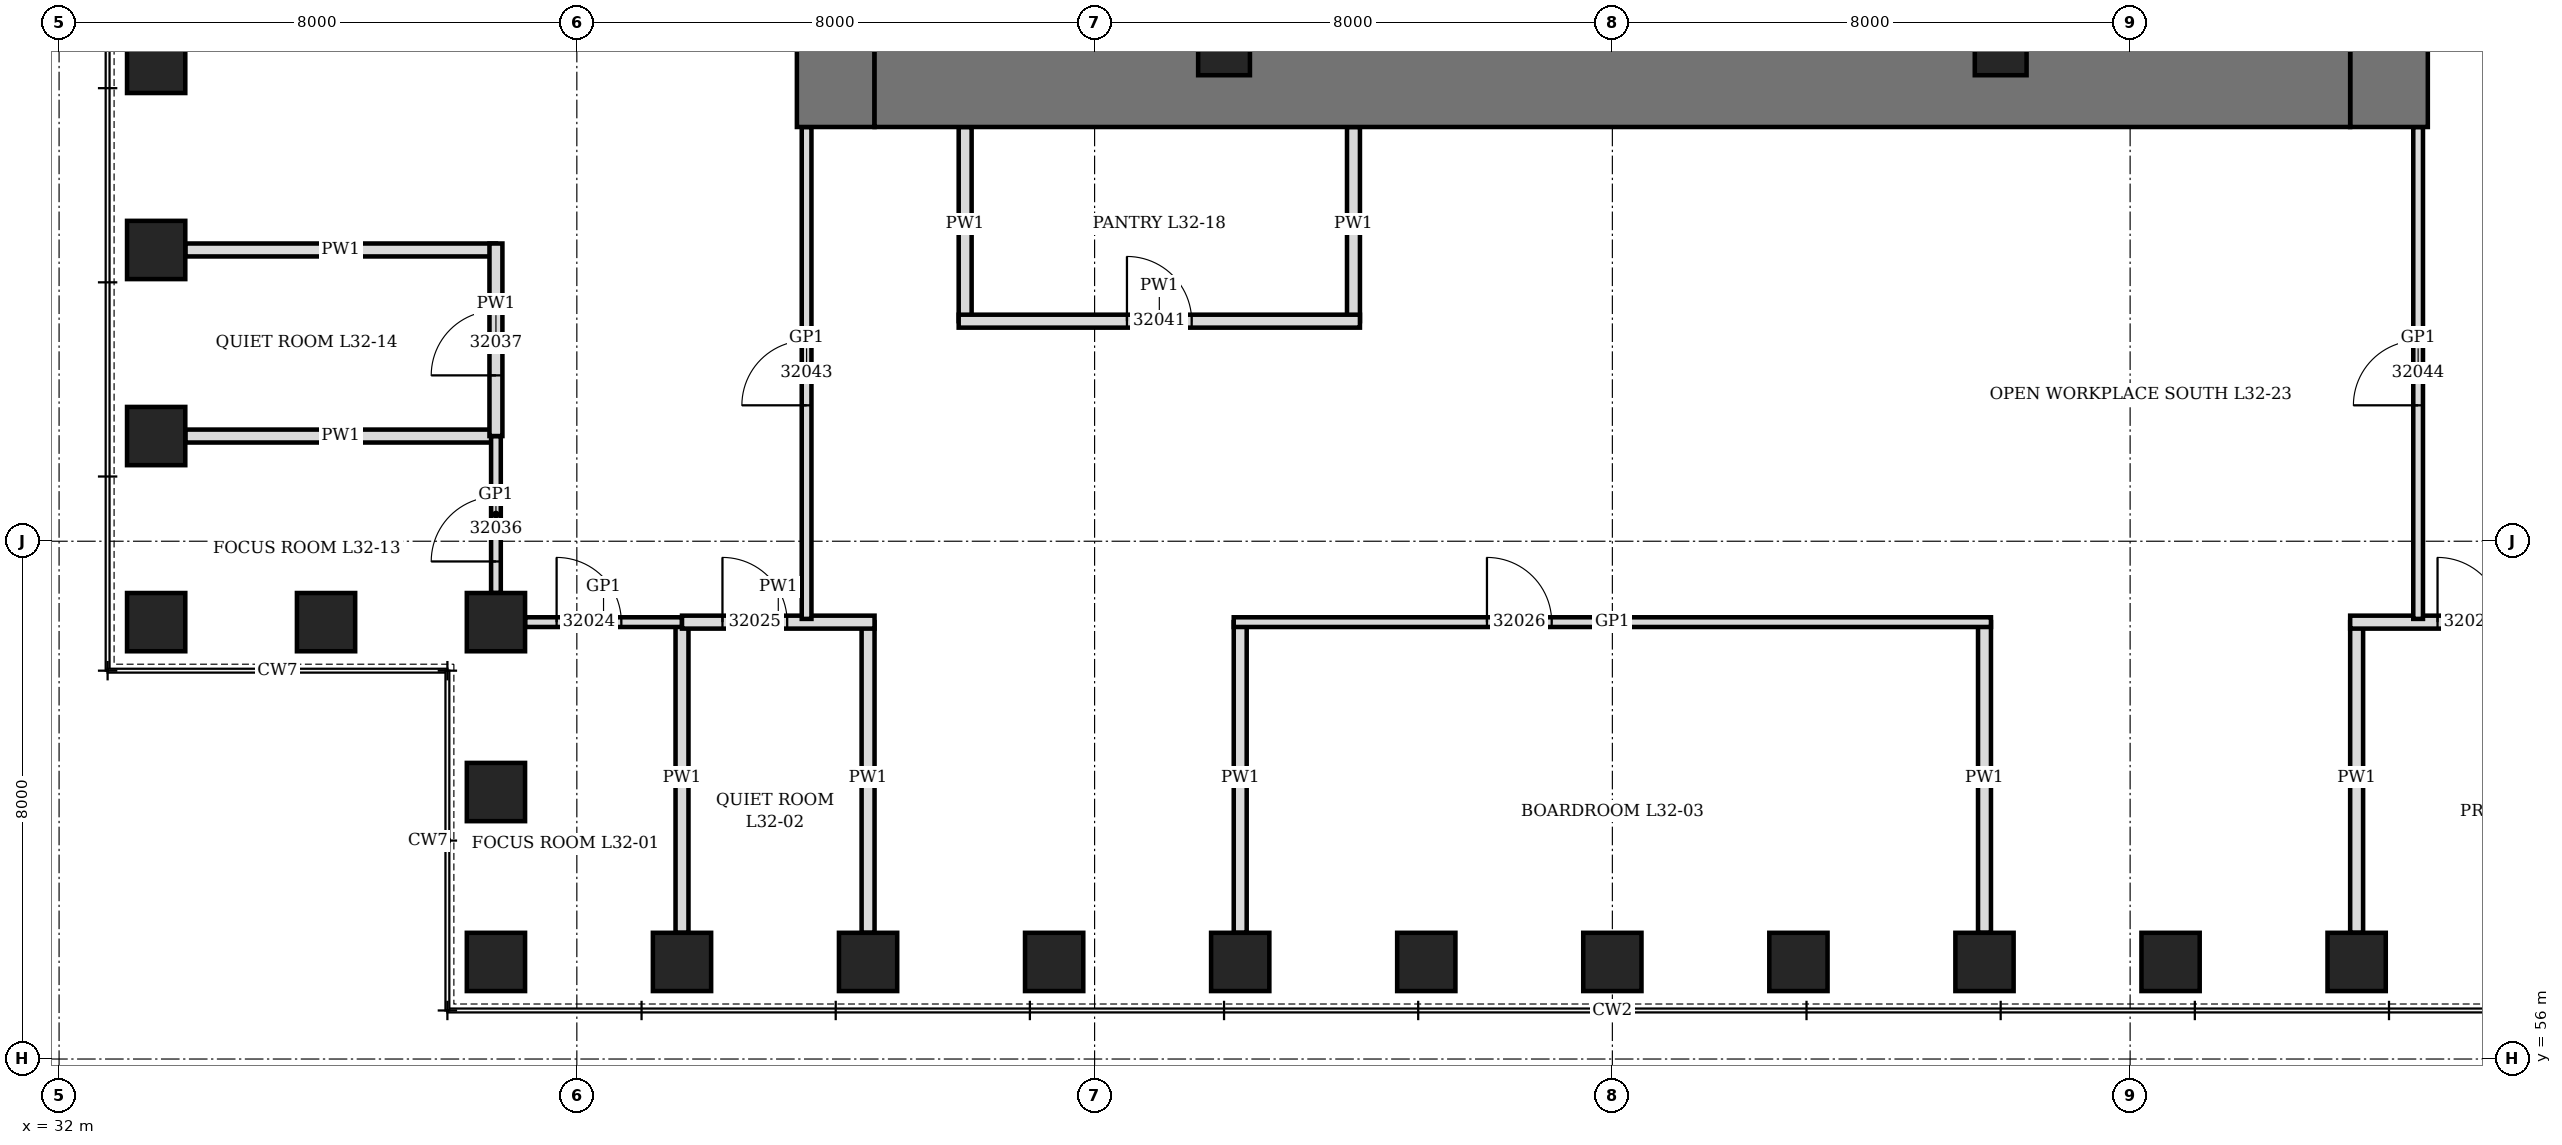
"""IFC4 building model, lengths in metres.
Left out: names, types, materials, properties, quantities, classifications, styles, units other than length and angle.
Written with IfcOpenShell. Run it as: python <this file> out.ifc"""

import sys

from ifc_helpers import new_model, si_unit, direction, frame, frame_2d, origin, origin_2d, place, context, subcontext, project, spatial, rectangle, hollow_rectangle, extrude, element, fill, save


model = new_model("IFC4")
c1 = context("Model", 3, precision=1e-05, world=origin(), true_north=direction((0.0, 1.0)))
c2 = subcontext(c1, "Body", "Model", "MODEL_VIEW")
j1 = project(units=[si_unit("LENGTHUNIT", "METRE"), si_unit("PLANEANGLEUNIT", "RADIAN")], contexts=[c1])
p1 = place(None, origin())
s1 = spatial("IfcSite", under=j1, at=p1, CompositionType="ELEMENT")
p2 = place(p1, origin())
s2 = spatial("IfcBuilding", under=s1, at=p2, CompositionType="ELEMENT")
p3 = place(p2, frame((0.0, 0.0, 145.9)))
s3 = spatial("IfcBuildingStorey", under=s2, at=p3, CompositionType="ELEMENT", Elevation=145.9)
for number, where, z_axis, x_axis in (
    (1, (38.75, 57.5, 0.0), (0.0, 0.0, 1.0), (1.0, 0.0, 0.0)),
    (2, (41.625, 57.5, 0.0), (0.0, 0.0, 1.0), (1.0, 0.0, 0.0)),
    (3, (44.5, 57.5, 0.0), (0.0, 0.0, 1.0), (1.0, 0.0, 0.0)),
    (4, (47.375, 57.5, 0.0), (0.0, 0.0, 1.0), (1.0, 0.0, 0.0)),
    (5, (50.25, 57.5, 0.0), (0.0, 0.0, 1.0), (1.0, 0.0, 0.0)),
    (6, (53.125, 57.5, 0.0), (0.0, 0.0, 1.0), (1.0, 0.0, 0.0)),
    (7, (56.0, 57.5, 0.0), (0.0, 0.0, 1.0), (1.0, 0.0, 0.0)),
    (8, (58.875, 57.5, 0.0), (0.0, 0.0, 1.0), (1.0, 0.0, 0.0)),
    (9, (61.75, 57.5, 0.0), (0.0, 0.0, 1.0), (1.0, 0.0, 0.0)),
    (10, (64.625, 57.5, 0.0), (0.0, 0.0, 1.0), (1.0, 0.0, 0.0)),
    (11, (67.5, 57.5, 0.0), (0.0, 0.0, 1.0), (1.0, 0.0, 0.0)),
    (12, (33.5, 71.375, 0.0), (0.0, 0.0, 1.0), (0.0, 1.0, 0.0)),
    (13, (33.5, 68.5, 0.0), (0.0, 0.0, 1.0), (0.0, 1.0, 0.0)),
    (14, (33.5, 65.625, 0.0), (0.0, 0.0, 1.0), (0.0, 1.0, 0.0)),
    (15, (33.5, 62.75, 0.0), (0.0, 0.0, 1.0), (1.0, 0.0, 0.0)),
    (16, (36.125, 62.75, 0.0), (0.0, 0.0, 1.0), (1.0, 0.0, 0.0)),
    (17, (38.75, 62.75, 0.0), (0.0, 0.0, 1.0), (0.0, 1.0, 0.0)),
    (18, (38.75, 60.125, 0.0), (0.0, 0.0, 1.0), (0.0, 1.0, 0.0)),
):
    element("IfcColumn", number, at=place(p3, frame(where, z_axis=z_axis, x_axis=x_axis)), inside=s3, PredefinedType="COLUMN", context=c2, shape_type="SweptSolid", body=[
        extrude(hollow_rectangle(XDim=0.9, YDim=0.9, WallThickness=0.12, at=origin_2d()), origin(), (0.0, 0.0, 1.0), 4.2),
    ])
p4 = place(p3, frame((44.0, 70.4, 0.0), z_axis=(0.0, 0.0, 1.0), x_axis=(0.0, 1.0, 0.0)))
e19 = element("IfcWall", 19, at=p4, inside=s3, PredefinedType="SHEAR", context=c2, shape_type="SweptSolid", body=[
    extrude(rectangle(XDim=19.2, YDim=1.2, at=frame_2d((9.6, 0.0))), origin(), (0.0, 0.0, 1.0), 4.2),
])
p5 = place(p4, frame((8.6, 0.0, 0.0)))
e20 = element("IfcOpeningElement", 20, at=p5, cuts=e19, PredefinedType="OPENING", context=c2, shape_type="SweptSolid", body=[
    extrude(rectangle(XDim=2.0, YDim=2.4, at=frame_2d((1.0, 1.2))), frame((0.0, 0.61, 0.0), z_axis=(0.0, -1.0, 0.0), x_axis=(1.0, 0.0, 0.0)), (0.0, 0.0, 1.0), 1.22),
])
p6 = place(p3, frame((68.0, 70.4, 0.0), z_axis=(0.0, 0.0, 1.0), x_axis=(0.0, 1.0, 0.0)))
e21 = element("IfcWall", 21, at=p6, inside=s3, PredefinedType="SHEAR", context=c2, shape_type="SweptSolid", body=[
    extrude(rectangle(XDim=19.2, YDim=1.2, at=frame_2d((9.6, 0.0))), origin(), (0.0, 0.0, 1.0), 4.2),
])
p7 = place(p6, frame((8.6, 0.0, 0.0)))
e22 = element("IfcOpeningElement", 22, at=p7, cuts=e21, PredefinedType="OPENING", context=c2, shape_type="SweptSolid", body=[
    extrude(rectangle(XDim=2.0, YDim=2.4, at=frame_2d((1.0, 1.2))), frame((0.0, 0.61, 0.0), z_axis=(0.0, -1.0, 0.0), x_axis=(1.0, 0.0, 0.0)), (0.0, 0.0, 1.0), 1.22),
])
p8 = place(p3, frame((44.6, 71.0, 0.0), z_axis=(0.0, 0.0, 1.0), x_axis=(1.0, 0.0, 0.0)))
e23 = element("IfcWall", 23, at=p8, inside=s3, PredefinedType="SHEAR", context=c2, shape_type="SweptSolid", body=[
    extrude(rectangle(XDim=22.8, YDim=1.2, at=frame_2d((11.4, 0.0))), origin(), (0.0, 0.0, 1.0), 4.2),
])
for number, where, z_axis, x_axis in (
    (24, (50.0, 71.6, 0.0), (0.0, 0.0, 1.0), (1.0, 0.0, 0.0)),
    (25, (62.0, 71.6, 0.0), (0.0, 0.0, 1.0), (1.0, 0.0, 0.0)),
):
    element("IfcColumn", number, at=place(p3, frame(where, z_axis=z_axis, x_axis=x_axis)), inside=s3, PredefinedType="COLUMN", context=c2, shape_type="SweptSolid", body=[
        extrude(hollow_rectangle(XDim=0.8, YDim=0.8, WallThickness=0.1, at=origin_2d()), origin(), (0.0, 0.0, 1.0), 4.2),
    ])
p9 = place(p3, frame((41.625, 57.95, 0.0), z_axis=(0.0, 0.0, 1.0), x_axis=(0.0, 1.0, 0.0)))
e26 = element("IfcWall", 26, at=p9, inside=s3, PredefinedType="PARTITIONING", context=c2, shape_type="SweptSolid", body=[
    extrude(rectangle(XDim=4.8, YDim=0.2, at=frame_2d((2.4, 0.0))), origin(), (0.0, 0.0, 1.0), 3.428),
])
p10 = place(p3, frame((44.5, 57.95, 0.0), z_axis=(0.0, 0.0, 1.0), x_axis=(0.0, 1.0, 0.0)))
e27 = element("IfcWall", 27, at=p10, inside=s3, PredefinedType="PARTITIONING", context=c2, shape_type="SweptSolid", body=[
    extrude(rectangle(XDim=4.8, YDim=0.2, at=frame_2d((2.4, 0.0))), origin(), (0.0, 0.0, 1.0), 2.74),
])
for number, where, z_axis, x_axis in (
    (28, (50.25, 57.95, 0.0), (0.0, 0.0, 1.0), (0.0, 1.0, 0.0)),
    (29, (61.75, 57.95, 0.0), (0.0, 0.0, 1.0), (0.0, 1.0, 0.0)),
):
    element("IfcWall", number, at=place(p3, frame(where, z_axis=z_axis, x_axis=x_axis)), inside=s3, PredefinedType="PARTITIONING", context=c2, shape_type="SweptSolid", body=[
        extrude(rectangle(XDim=4.8, YDim=0.2, at=frame_2d((2.4, 0.0))), origin(), (0.0, 0.0, 1.0), 3.278),
    ])
p11 = place(p3, frame((67.5, 57.95, 0.0), z_axis=(0.0, 0.0, 1.0), x_axis=(0.0, 1.0, 0.0)))
e30 = element("IfcWall", 30, at=p11, inside=s3, PredefinedType="PARTITIONING", context=c2, shape_type="SweptSolid", body=[
    extrude(rectangle(XDim=4.8, YDim=0.2, at=frame_2d((2.4, 0.0))), origin(), (0.0, 0.0, 1.0), 2.74),
])
for number, where, z_axis, x_axis in (
    (31, (33.95, 65.625, 0.0), (0.0, 0.0, 1.0), (1.0, 0.0, 0.0)),
    (32, (33.95, 68.5, 0.0), (0.0, 0.0, 1.0), (1.0, 0.0, 0.0)),
):
    element("IfcWall", number, at=place(p3, frame(where, z_axis=z_axis, x_axis=x_axis)), inside=s3, PredefinedType="PARTITIONING", context=c2, shape_type="SweptSolid", body=[
        extrude(rectangle(XDim=4.8, YDim=0.2, at=frame_2d((2.4, 0.0))), origin(), (0.0, 0.0, 1.0), 3.428),
    ])
for number, where, z_axis, x_axis in (
    (33, (46.0, 67.4, 0.0), (0.0, 0.0, 1.0), (0.0, 1.0, 0.0)),
    (34, (52.0, 67.4, 0.0), (0.0, 0.0, 1.0), (0.0, 1.0, 0.0)),
):
    element("IfcWall", number, at=place(p3, frame(where, z_axis=z_axis, x_axis=x_axis)), inside=s3, PredefinedType="PARTITIONING", context=c2, shape_type="SweptSolid", body=[
        extrude(rectangle(XDim=3.0, YDim=0.2, at=frame_2d((1.5, 0.0))), origin(), (0.0, 0.0, 1.0), 4.04),
    ])
p12 = place(p3, frame((39.2, 62.75, 0.0), z_axis=(0.0, 0.0, 1.0), x_axis=(1.0, 0.0, 0.0)))
e35 = element("IfcWall", 35, at=p12, inside=s3, PredefinedType="PARTITIONING", context=c2, shape_type="SweptSolid", body=[
    extrude(rectangle(XDim=2.425, YDim=0.15, at=frame_2d((1.212, 0.0))), origin(), (0.0, 0.0, 1.0), 4.04),
])
p13 = place(p12, frame((0.488, 0.0, 0.0)))
e36 = element("IfcOpeningElement", 36, at=p13, cuts=e35, PredefinedType="OPENING", context=c2, shape_type="SweptSolid", body=[
    extrude(rectangle(XDim=1.0, YDim=2.4, at=frame_2d((0.5, 1.2))), frame((0.0, 0.085, 0.0), z_axis=(0.0, -1.0, 0.0), x_axis=(1.0, 0.0, 0.0)), (0.0, 0.0, 1.0), 0.17),
])
p14 = place(p3, frame((50.15, 62.75, 0.0), z_axis=(0.0, 0.0, 1.0), x_axis=(1.0, 0.0, 0.0)))
e37 = element("IfcWall", 37, at=p14, inside=s3, PredefinedType="PARTITIONING", context=c2, shape_type="SweptSolid", body=[
    extrude(rectangle(XDim=11.7, YDim=0.15, at=frame_2d((5.85, 0.0))), origin(), (0.0, 0.0, 1.0), 4.04),
])
p15 = place(p14, frame((3.913, 0.0, 0.0)))
e38 = element("IfcOpeningElement", 38, at=p15, cuts=e37, PredefinedType="OPENING", context=c2, shape_type="SweptSolid", body=[
    extrude(rectangle(XDim=1.0, YDim=2.4, at=frame_2d((0.5, 1.2))), frame((0.0, 0.085, 0.0), z_axis=(0.0, -1.0, 0.0), x_axis=(1.0, 0.0, 0.0)), (0.0, 0.0, 1.0), 0.17),
])
p16 = place(p3, frame((41.625, 62.75, 0.0), z_axis=(0.0, 0.0, 1.0), x_axis=(1.0, 0.0, 0.0)))
e39 = element("IfcWall", 39, at=p16, inside=s3, PredefinedType="PARTITIONING", context=c2, shape_type="SweptSolid", body=[
    extrude(rectangle(XDim=2.975, YDim=0.2, at=frame_2d((1.488, 0.0))), origin(), (0.0, 0.0, 1.0), 4.04),
])
p17 = place(p16, frame((0.625, 0.0, 0.0)))
e40 = element("IfcOpeningElement", 40, at=p17, cuts=e39, PredefinedType="OPENING", context=c2, shape_type="SweptSolid", body=[
    extrude(rectangle(XDim=1.0, YDim=2.1, at=frame_2d((0.5, 1.05))), frame((0.0, 0.11, 0.0), z_axis=(0.0, -1.0, 0.0), x_axis=(1.0, 0.0, 0.0)), (0.0, 0.0, 1.0), 0.22),
])
p18 = place(p3, frame((67.4, 62.75, 0.0), z_axis=(0.0, 0.0, 1.0), x_axis=(1.0, 0.0, 0.0)))
e41 = element("IfcWall", 41, at=p18, inside=s3, PredefinedType="PARTITIONING", context=c2, shape_type="SweptSolid", body=[
    extrude(rectangle(XDim=5.4, YDim=0.2, at=frame_2d((2.7, 0.0))), origin(), (0.0, 0.0, 1.0), 4.04),
])
p19 = place(p18, frame((1.35, 0.0, 0.0)))
e42 = element("IfcOpeningElement", 42, at=p19, cuts=e41, PredefinedType="OPENING", context=c2, shape_type="SweptSolid", body=[
    extrude(rectangle(XDim=1.0, YDim=2.1, at=frame_2d((0.5, 1.05))), frame((0.0, 0.11, 0.0), z_axis=(0.0, -1.0, 0.0), x_axis=(1.0, 0.0, 0.0)), (0.0, 0.0, 1.0), 0.22),
])
p20 = place(p3, frame((45.9, 67.4, 0.0), z_axis=(0.0, 0.0, 1.0), x_axis=(1.0, 0.0, 0.0)))
e43 = element("IfcWall", 43, at=p20, inside=s3, PredefinedType="PARTITIONING", context=c2, shape_type="SweptSolid", body=[
    extrude(rectangle(XDim=6.2, YDim=0.2, at=frame_2d((3.1, 0.0))), origin(), (0.0, 0.0, 1.0), 4.04),
])
p21 = place(p20, frame((2.6, 0.0, 0.0)))
e44 = element("IfcOpeningElement", 44, at=p21, cuts=e43, PredefinedType="OPENING", context=c2, shape_type="SweptSolid", body=[
    extrude(rectangle(XDim=1.0, YDim=2.1, at=frame_2d((0.5, 1.05))), frame((0.0, 0.11, 0.0), z_axis=(0.0, -1.0, 0.0), x_axis=(1.0, 0.0, 0.0)), (0.0, 0.0, 1.0), 0.22),
])
p22 = place(p3, frame((38.75, 63.2, 0.0), z_axis=(0.0, 0.0, 1.0), x_axis=(0.0, 1.0, 0.0)))
e45 = element("IfcWall", 45, at=p22, inside=s3, PredefinedType="PARTITIONING", context=c2, shape_type="SweptSolid", body=[
    extrude(rectangle(XDim=2.425, YDim=0.15, at=frame_2d((1.212, 0.0))), origin(), (0.0, 0.0, 1.0), 4.04),
])
p23 = place(p22, frame((0.488, 0.0, 0.0)))
e46 = element("IfcOpeningElement", 46, at=p23, cuts=e45, PredefinedType="OPENING", context=c2, shape_type="SweptSolid", body=[
    extrude(rectangle(XDim=1.0, YDim=2.4, at=frame_2d((0.5, 1.2))), frame((0.0, 0.085, 0.0), z_axis=(0.0, -1.0, 0.0), x_axis=(1.0, 0.0, 0.0)), (0.0, 0.0, 1.0), 0.17),
])
p24 = place(p3, frame((38.75, 65.625, 0.0), z_axis=(0.0, 0.0, 1.0), x_axis=(0.0, 1.0, 0.0)))
e47 = element("IfcWall", 47, at=p24, inside=s3, PredefinedType="PARTITIONING", context=c2, shape_type="SweptSolid", body=[
    extrude(rectangle(XDim=2.975, YDim=0.2, at=frame_2d((1.488, 0.0))), origin(), (0.0, 0.0, 1.0), 4.04),
])
p25 = place(p24, frame((0.938, 0.0, 0.0)))
e48 = element("IfcOpeningElement", 48, at=p25, cuts=e47, PredefinedType="OPENING", context=c2, shape_type="SweptSolid", body=[
    extrude(rectangle(XDim=1.0, YDim=2.1, at=frame_2d((0.5, 1.05))), frame((0.0, 0.11, 0.0), z_axis=(0.0, -1.0, 0.0), x_axis=(1.0, 0.0, 0.0)), (0.0, 0.0, 1.0), 0.22),
])
p26 = place(p3, frame((43.55, 62.8, 0.0), z_axis=(0.0, 0.0, 1.0), x_axis=(0.0, 1.0, 0.0)))
e49 = element("IfcWall", 49, at=p26, inside=s3, PredefinedType="PARTITIONING", context=c2, shape_type="SweptSolid", body=[
    extrude(rectangle(XDim=7.6, YDim=0.15, at=frame_2d((3.8, 0.0))), origin(), (0.0, 0.0, 1.0), 4.04),
])
p27 = place(p26, frame((3.3, 0.0, 0.0)))
e50 = element("IfcOpeningElement", 50, at=p27, cuts=e49, PredefinedType="OPENING", context=c2, shape_type="SweptSolid", body=[
    extrude(rectangle(XDim=1.0, YDim=2.4, at=frame_2d((0.5, 1.2))), frame((0.0, 0.085, 0.0), z_axis=(0.0, -1.0, 0.0), x_axis=(1.0, 0.0, 0.0)), (0.0, 0.0, 1.0), 0.17),
])
p28 = place(p3, frame((68.45, 62.8, 0.0), z_axis=(0.0, 0.0, 1.0), x_axis=(0.0, 1.0, 0.0)))
e51 = element("IfcWall", 51, at=p28, inside=s3, PredefinedType="PARTITIONING", context=c2, shape_type="SweptSolid", body=[
    extrude(rectangle(XDim=7.6, YDim=0.15, at=frame_2d((3.8, 0.0))), origin(), (0.0, 0.0, 1.0), 4.04),
])
p29 = place(p28, frame((3.3, 0.0, 0.0)))
e52 = element("IfcOpeningElement", 52, at=p29, cuts=e51, PredefinedType="OPENING", context=c2, shape_type="SweptSolid", body=[
    extrude(rectangle(XDim=1.0, YDim=2.4, at=frame_2d((0.5, 1.2))), frame((0.0, 0.085, 0.0), z_axis=(0.0, -1.0, 0.0), x_axis=(1.0, 0.0, 0.0)), (0.0, 0.0, 1.0), 0.17),
])
p30 = place(p13, origin())
e53 = element("IfcDoor", 53, at=p30, inside=s3, OperationType="SINGLE_SWING_RIGHT", PredefinedType="DOOR", context=c2, shape_type="SweptSolid", body=[
    extrude(rectangle(XDim=1.0, YDim=2.4, at=frame_2d((0.5, 1.2))), frame((0.0, 0.075, 0.0), z_axis=(0.0, -1.0, 0.0), x_axis=(1.0, 0.0, 0.0)), (0.0, 0.0, 1.0), 0.149),
])
fill(e36, e53)
p31 = place(p17, origin())
e54 = element("IfcDoor", 54, at=p31, inside=s3, OperationType="SINGLE_SWING_LEFT", PredefinedType="DOOR", context=c2, shape_type="SweptSolid", body=[
    extrude(rectangle(XDim=1.0, YDim=2.1, at=frame_2d((0.5, 1.05))), frame((0.0, 0.1, 0.0), z_axis=(0.0, -1.0, 0.0), x_axis=(1.0, 0.0, 0.0)), (0.0, 0.0, 1.0), 0.199),
])
fill(e40, e54)
p32 = place(p15, origin())
e55 = element("IfcDoor", 55, at=p32, inside=s3, OperationType="SINGLE_SWING_RIGHT", PredefinedType="DOOR", context=c2, shape_type="SweptSolid", body=[
    extrude(rectangle(XDim=1.0, YDim=2.4, at=frame_2d((0.5, 1.2))), frame((0.0, 0.075, 0.0), z_axis=(0.0, -1.0, 0.0), x_axis=(1.0, 0.0, 0.0)), (0.0, 0.0, 1.0), 0.149),
])
fill(e38, e55)
p33 = place(p19, origin())
e56 = element("IfcDoor", 56, at=p33, inside=s3, OperationType="SINGLE_SWING_LEFT", PredefinedType="DOOR", context=c2, shape_type="SweptSolid", body=[
    extrude(rectangle(XDim=1.0, YDim=2.1, at=frame_2d((0.5, 1.05))), frame((0.0, 0.1, 0.0), z_axis=(0.0, -1.0, 0.0), x_axis=(1.0, 0.0, 0.0)), (0.0, 0.0, 1.0), 0.199),
])
fill(e42, e56)
p34 = place(p23, origin())
e57 = element("IfcDoor", 57, at=p34, inside=s3, OperationType="SINGLE_SWING_RIGHT", PredefinedType="DOOR", context=c2, shape_type="SweptSolid", body=[
    extrude(rectangle(XDim=1.0, YDim=2.4, at=frame_2d((0.5, 1.2))), frame((0.0, 0.075, 0.0), z_axis=(0.0, -1.0, 0.0), x_axis=(1.0, 0.0, 0.0)), (0.0, 0.0, 1.0), 0.149),
])
fill(e46, e57)
p35 = place(p25, origin())
e58 = element("IfcDoor", 58, at=p35, inside=s3, OperationType="SINGLE_SWING_LEFT", PredefinedType="DOOR", context=c2, shape_type="SweptSolid", body=[
    extrude(rectangle(XDim=1.0, YDim=2.1, at=frame_2d((0.5, 1.05))), frame((0.0, 0.1, 0.0), z_axis=(0.0, -1.0, 0.0), x_axis=(1.0, 0.0, 0.0)), (0.0, 0.0, 1.0), 0.199),
])
fill(e48, e58)
p36 = place(p21, origin())
e59 = element("IfcDoor", 59, at=p36, inside=s3, OperationType="SINGLE_SWING_LEFT", PredefinedType="DOOR", context=c2, shape_type="SweptSolid", body=[
    extrude(rectangle(XDim=1.0, YDim=2.1, at=frame_2d((0.5, 1.05))), frame((0.0, 0.1, 0.0), z_axis=(0.0, -1.0, 0.0), x_axis=(1.0, 0.0, 0.0)), (0.0, 0.0, 1.0), 0.199),
])
fill(e44, e59)
p37 = place(p27, origin())
e60 = element("IfcDoor", 60, at=p37, inside=s3, OperationType="SINGLE_SWING_RIGHT", PredefinedType="DOOR", context=c2, shape_type="SweptSolid", body=[
    extrude(rectangle(XDim=1.0, YDim=2.4, at=frame_2d((0.5, 1.2))), frame((0.0, 0.075, 0.0), z_axis=(0.0, -1.0, 0.0), x_axis=(1.0, 0.0, 0.0)), (0.0, 0.0, 1.0), 0.149),
])
fill(e50, e60)
p38 = place(p29, origin())
e61 = element("IfcDoor", 61, at=p38, inside=s3, OperationType="SINGLE_SWING_RIGHT", PredefinedType="DOOR", context=c2, shape_type="SweptSolid", body=[
    extrude(rectangle(XDim=1.0, YDim=2.4, at=frame_2d((0.5, 1.2))), frame((0.0, 0.075, 0.0), z_axis=(0.0, -1.0, 0.0), x_axis=(1.0, 0.0, 0.0)), (0.0, 0.0, 1.0), 0.149),
])
fill(e52, e61)
save(model, sys.argv[1])
